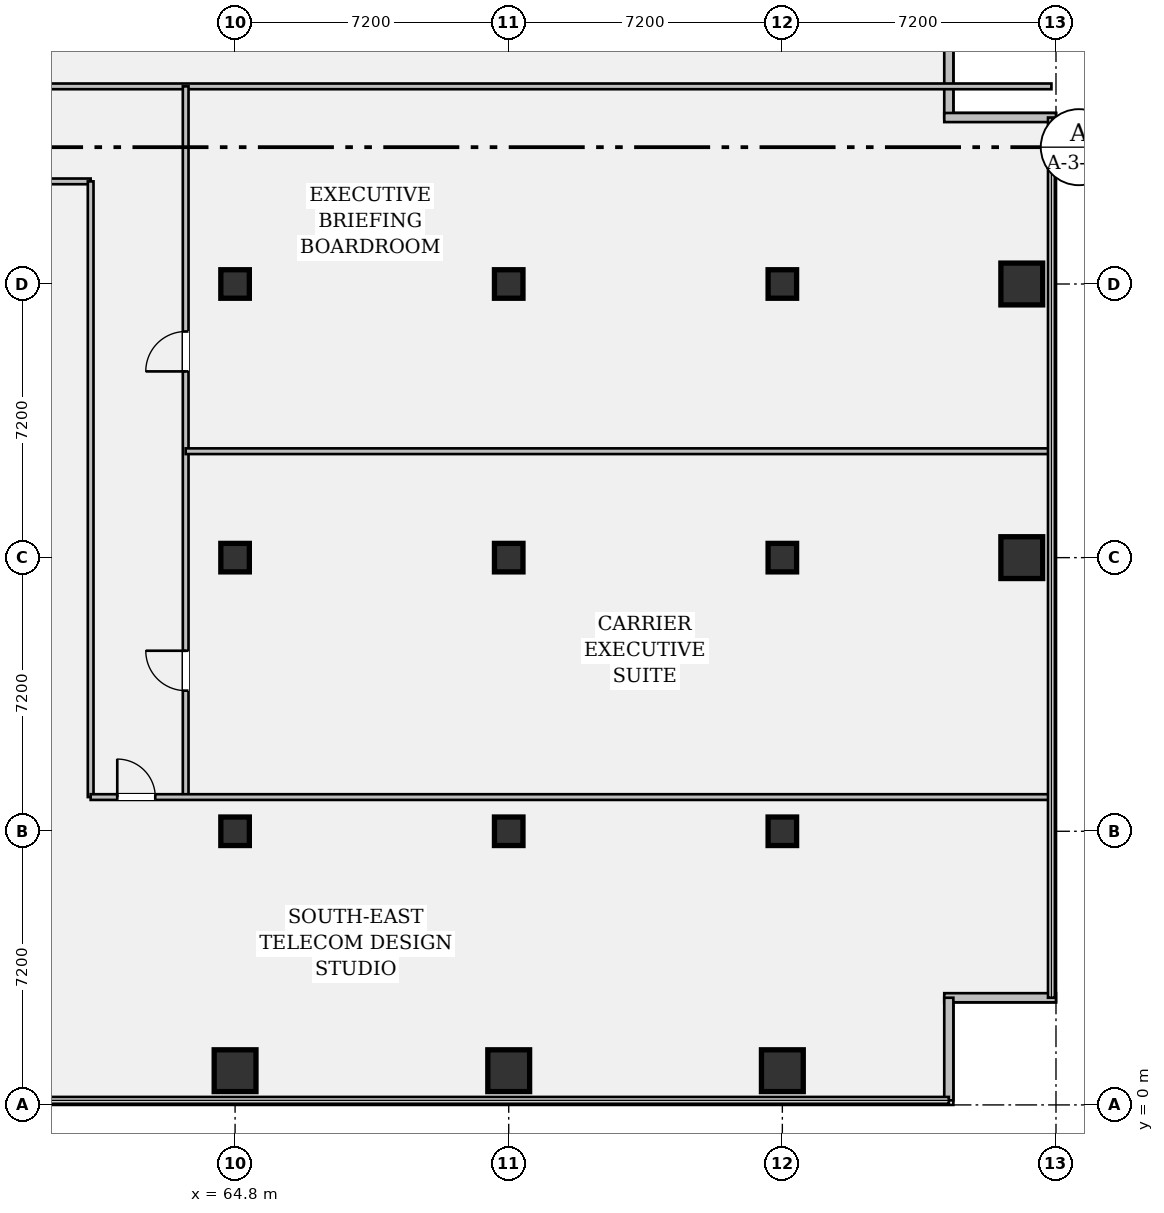
"""IFC4 building model, lengths in metres.
Left out: names, types, materials, properties, quantities, classifications, styles, units other than length and angle.
Written with IfcOpenShell. Run it as: python <this file> out.ifc"""

import sys

from ifc_helpers import new_model, si_unit, direction, frame, frame_2d, origin, origin_2d, place, context, subcontext, project, spatial, rectangle, hollow_rectangle, extrude, element, fill, save


model = new_model("IFC4")
c1 = context("Model", 3, precision=1e-05, world=origin(), true_north=direction((0.0, 1.0)))
c2 = subcontext(c1, "Body", "Model", "MODEL_VIEW")
j1 = project(units=[si_unit("LENGTHUNIT", "METRE"), si_unit("PLANEANGLEUNIT", "RADIAN")], contexts=[c1])
p1 = place(None, origin())
s1 = spatial("IfcSite", under=j1, at=p1, CompositionType="ELEMENT")
p2 = place(p1, origin())
s2 = spatial("IfcBuilding", under=s1, at=p2, CompositionType="ELEMENT")
p3 = place(p2, frame((0.0, 0.0, 22.05)))
s3 = spatial("IfcBuildingStorey", under=s2, at=p3, CompositionType="ELEMENT", Elevation=22.05)
p4 = place(p3, frame((64.8, 0.9, 0.0), z_axis=(0.0, 0.0, 1.0), x_axis=(1.0, 0.0, 0.0)))
e1 = element("IfcColumn", 1, at=p4, inside=s3, PredefinedType="COLUMN", context=c2, shape_type="SweptSolid", body=[
    extrude(hollow_rectangle(XDim=1.1, YDim=1.1, WallThickness=0.07, at=origin_2d()), origin(), (0.0, 0.0, 1.0), 3.9),
])
for number, where, z_axis, x_axis in (
    (2, (64.8, 7.2, 0.0), (0.0, 0.0, 1.0), (1.0, 0.0, 0.0)),
    (3, (64.8, 14.4, 0.0), (0.0, 0.0, 1.0), (1.0, 0.0, 0.0)),
    (4, (64.8, 21.6, 0.0), (0.0, 0.0, 1.0), (1.0, 0.0, 0.0)),
):
    element("IfcColumn", number, at=place(p3, frame(where, z_axis=z_axis, x_axis=x_axis)), inside=s3, PredefinedType="COLUMN", context=c2, shape_type="SweptSolid", body=[
        extrude(rectangle(XDim=0.75, YDim=0.75, at=origin_2d()), origin(), (0.0, 0.0, 1.0), 3.9),
    ])
p5 = place(p3, frame((72.0, 0.9, 0.0), z_axis=(0.0, 0.0, 1.0), x_axis=(1.0, 0.0, 0.0)))
e5 = element("IfcColumn", 5, at=p5, inside=s3, PredefinedType="COLUMN", context=c2, shape_type="SweptSolid", body=[
    extrude(hollow_rectangle(XDim=1.1, YDim=1.1, WallThickness=0.07, at=origin_2d()), origin(), (0.0, 0.0, 1.0), 3.9),
])
for number, where, z_axis, x_axis in (
    (6, (72.0, 7.2, 0.0), (0.0, 0.0, 1.0), (1.0, 0.0, 0.0)),
    (7, (72.0, 14.4, 0.0), (0.0, 0.0, 1.0), (1.0, 0.0, 0.0)),
    (8, (72.0, 21.6, 0.0), (0.0, 0.0, 1.0), (1.0, 0.0, 0.0)),
):
    element("IfcColumn", number, at=place(p3, frame(where, z_axis=z_axis, x_axis=x_axis)), inside=s3, PredefinedType="COLUMN", context=c2, shape_type="SweptSolid", body=[
        extrude(rectangle(XDim=0.75, YDim=0.75, at=origin_2d()), origin(), (0.0, 0.0, 1.0), 3.9),
    ])
p6 = place(p3, frame((79.2, 0.9, 0.0), z_axis=(0.0, 0.0, 1.0), x_axis=(1.0, 0.0, 0.0)))
e9 = element("IfcColumn", 9, at=p6, inside=s3, PredefinedType="COLUMN", context=c2, shape_type="SweptSolid", body=[
    extrude(hollow_rectangle(XDim=1.1, YDim=1.1, WallThickness=0.07, at=origin_2d()), origin(), (0.0, 0.0, 1.0), 3.9),
])
for number, where, z_axis, x_axis in (
    (10, (79.2, 7.2, 0.0), (0.0, 0.0, 1.0), (1.0, 0.0, 0.0)),
    (11, (79.2, 14.4, 0.0), (0.0, 0.0, 1.0), (1.0, 0.0, 0.0)),
    (12, (79.2, 21.6, 0.0), (0.0, 0.0, 1.0), (1.0, 0.0, 0.0)),
):
    element("IfcColumn", number, at=place(p3, frame(where, z_axis=z_axis, x_axis=x_axis)), inside=s3, PredefinedType="COLUMN", context=c2, shape_type="SweptSolid", body=[
        extrude(rectangle(XDim=0.75, YDim=0.75, at=origin_2d()), origin(), (0.0, 0.0, 1.0), 3.9),
    ])
for number, where, z_axis, x_axis in (
    (13, (85.5, 14.4, 0.0), (0.0, 0.0, 1.0), (1.0, 0.0, 0.0)),
    (14, (85.5, 21.6, 0.0), (0.0, 0.0, 1.0), (1.0, 0.0, 0.0)),
):
    element("IfcColumn", number, at=place(p3, frame(where, z_axis=z_axis, x_axis=x_axis)), inside=s3, PredefinedType="COLUMN", context=c2, shape_type="SweptSolid", body=[
        extrude(hollow_rectangle(XDim=1.1, YDim=1.1, WallThickness=0.07, at=origin_2d()), origin(), (0.0, 0.0, 1.0), 3.9),
    ])
p7 = place(p3, frame((83.58, 28.68, 0.0), z_axis=(0.0, 0.0, 1.0), x_axis=(0.0, -1.0, 0.0)))
e15 = element("IfcWall", 15, at=p7, inside=s3, PredefinedType="STANDARD", context=c2, shape_type="SweptSolid", body=[
    extrude(rectangle(XDim=2.7, YDim=0.24, at=frame_2d((1.35, 0.0))), origin(), (0.0, 0.0, 1.0), 3.9),
])
for number, where, z_axis, x_axis in (
    (16, (83.46, 25.98, 0.0), (0.0, 0.0, 1.0), (1.0, 0.0, 0.0)),
    (17, (86.4, 2.82, 0.0), (0.0, 0.0, 1.0), (-1.0, 0.0, 0.0)),
):
    element("IfcWall", number, at=place(p3, frame(where, z_axis=z_axis, x_axis=x_axis)), inside=s3, PredefinedType="STANDARD", context=c2, shape_type="SweptSolid", body=[
        extrude(rectangle(XDim=2.94, YDim=0.24, at=frame_2d((1.47, 0.0))), origin(), (0.0, 0.0, 1.0), 3.9),
    ])
p8 = place(p3, frame((83.58, 2.82, 0.0), z_axis=(0.0, 0.0, 1.0), x_axis=(0.0, -1.0, 0.0)))
e18 = element("IfcWall", 18, at=p8, inside=s3, PredefinedType="STANDARD", context=c2, shape_type="SweptSolid", body=[
    extrude(rectangle(XDim=2.7, YDim=0.24, at=frame_2d((1.35, 0.0))), origin(), (0.0, 0.0, 1.0), 3.9),
])
p9 = place(p3, frame((17.45, 24.3, 0.0), z_axis=(0.0, 0.0, 1.0), x_axis=(1.0, 0.0, 0.0)))
e19 = element("IfcWall", 19, at=p9, inside=s3, PredefinedType="PARTITIONING", context=c2, shape_type="SweptSolid", body=[
    extrude(rectangle(XDim=43.55, YDim=0.15, at=frame_2d((21.775, 0.0))), origin(), (0.0, 0.0, 1.0), 2.958),
])
p10 = place(p9, frame((3.2, 0.0, 0.0)))
e20 = element("IfcOpeningElement", 20, at=p10, cuts=e19, PredefinedType="OPENING", context=c2, shape_type="SweptSolid", body=[
    extrude(rectangle(XDim=1.2, YDim=2.15, at=frame_2d((0.6, 1.075))), frame((0.0, 0.087, 0.0), z_axis=(0.0, -1.0, 0.0), x_axis=(1.0, 0.0, 0.0)), (0.0, 0.0, 1.0), 0.174),
])
p11 = place(p9, frame((20.95, 0.0, 0.0)))
e21 = element("IfcOpeningElement", 21, at=p11, cuts=e19, PredefinedType="OPENING", context=c2, shape_type="SweptSolid", body=[
    extrude(rectangle(XDim=1.2, YDim=2.15, at=frame_2d((0.6, 1.075))), frame((0.0, 0.087, 0.0), z_axis=(0.0, -1.0, 0.0), x_axis=(1.0, 0.0, 0.0)), (0.0, 0.0, 1.0), 0.174),
])
p12 = place(p9, frame((30.55, 0.0, 0.0)))
e22 = element("IfcOpeningElement", 22, at=p12, cuts=e19, PredefinedType="OPENING", context=c2, shape_type="SweptSolid", body=[
    extrude(rectangle(XDim=1.05, YDim=2.15, at=frame_2d((0.525, 1.075))), frame((0.0, 0.087, 0.0), z_axis=(0.0, -1.0, 0.0), x_axis=(1.0, 0.0, 0.0)), (0.0, 0.0, 1.0), 0.174),
])
p13 = place(p3, frame((17.45, 26.8, 0.0), z_axis=(0.0, 0.0, 1.0), x_axis=(1.0, 0.0, 0.0)))
e23 = element("IfcWall", 23, at=p13, inside=s3, PredefinedType="PARTITIONING", context=c2, shape_type="SweptSolid", body=[
    extrude(rectangle(XDim=68.83, YDim=0.15, at=frame_2d((34.415, 0.0))), origin(), (0.0, 0.0, 1.0), 2.958),
])
p14 = place(p13, frame((6.2, 0.0, 0.0)))
e24 = element("IfcOpeningElement", 24, at=p14, cuts=e23, PredefinedType="OPENING", context=c2, shape_type="SweptSolid", body=[
    extrude(rectangle(XDim=1.05, YDim=2.15, at=frame_2d((0.525, 1.075))), frame((0.0, 0.087, 0.0), z_axis=(0.0, -1.0, 0.0), x_axis=(1.0, 0.0, 0.0)), (0.0, 0.0, 1.0), 0.174),
])
p15 = place(p13, frame((20.4, 0.0, 0.0)))
e25 = element("IfcOpeningElement", 25, at=p15, cuts=e23, PredefinedType="OPENING", context=c2, shape_type="SweptSolid", body=[
    extrude(rectangle(XDim=1.05, YDim=2.15, at=frame_2d((0.525, 1.075))), frame((0.0, 0.087, 0.0), z_axis=(0.0, -1.0, 0.0), x_axis=(1.0, 0.0, 0.0)), (0.0, 0.0, 1.0), 0.174),
])
p16 = place(p3, frame((61.0, 8.1, 0.0), z_axis=(0.0, 0.0, 1.0), x_axis=(0.0, 1.0, 0.0)))
e26 = element("IfcWall", 26, at=p16, inside=s3, PredefinedType="PARTITIONING", context=c2, shape_type="SweptSolid", body=[
    extrude(rectangle(XDim=16.2, YDim=0.15, at=frame_2d((8.1, 0.0))), origin(), (0.0, 0.0, 1.0), 2.958),
])
p17 = place(p3, frame((63.5, 8.1, 0.0), z_axis=(0.0, 0.0, 1.0), x_axis=(0.0, 1.0, 0.0)))
e27 = element("IfcWall", 27, at=p17, inside=s3, PredefinedType="PARTITIONING", context=c2, shape_type="SweptSolid", body=[
    extrude(rectangle(XDim=18.7, YDim=0.15, at=frame_2d((9.35, 0.0))), origin(), (0.0, 0.0, 1.0), 2.958),
])
p18 = place(p17, frame((11.2, 0.0, 0.0)))
e28 = element("IfcOpeningElement", 28, at=p18, cuts=e27, PredefinedType="OPENING", context=c2, shape_type="SweptSolid", body=[
    extrude(rectangle(XDim=1.05, YDim=2.15, at=frame_2d((0.525, 1.075))), frame((0.0, 0.087, 0.0), z_axis=(0.0, -1.0, 0.0), x_axis=(1.0, 0.0, 0.0)), (0.0, 0.0, 1.0), 0.174),
])
p19 = place(p17, frame((2.8, 0.0, 0.0)))
e29 = element("IfcOpeningElement", 29, at=p19, cuts=e27, PredefinedType="OPENING", context=c2, shape_type="SweptSolid", body=[
    extrude(rectangle(XDim=1.05, YDim=2.15, at=frame_2d((0.525, 1.075))), frame((0.0, 0.087, 0.0), z_axis=(0.0, -1.0, 0.0), x_axis=(1.0, 0.0, 0.0)), (0.0, 0.0, 1.0), 0.174),
])
p20 = place(p3, frame((61.0, 8.1, 0.0), z_axis=(0.0, 0.0, 1.0), x_axis=(1.0, 0.0, 0.0)))
e30 = element("IfcWall", 30, at=p20, inside=s3, PredefinedType="PARTITIONING", context=c2, shape_type="SweptSolid", body=[
    extrude(rectangle(XDim=25.28, YDim=0.15, at=frame_2d((12.64, 0.0))), origin(), (0.0, 0.0, 1.0), 2.958),
])
p21 = place(p20, frame((0.7, 0.0, 0.0)))
e31 = element("IfcOpeningElement", 31, at=p21, cuts=e30, PredefinedType="OPENING", context=c2, shape_type="SweptSolid", body=[
    extrude(rectangle(XDim=1.0, YDim=2.15, at=frame_2d((0.5, 1.075))), frame((0.0, 0.087, 0.0), z_axis=(0.0, -1.0, 0.0), x_axis=(1.0, 0.0, 0.0)), (0.0, 0.0, 1.0), 0.174),
])
p22 = place(p3, frame((63.5, 17.2, 0.0), z_axis=(0.0, 0.0, 1.0), x_axis=(1.0, 0.0, 0.0)))
e32 = element("IfcWall", 32, at=p22, inside=s3, PredefinedType="PARTITIONING", context=c2, shape_type="SweptSolid", body=[
    extrude(rectangle(XDim=22.78, YDim=0.15, at=frame_2d((11.39, 0.0))), origin(), (0.0, 0.0, 1.0), 2.958),
])
p23 = place(p18, origin())
e33 = element("IfcDoor", 33, at=p23, inside=s3, OperationType="SINGLE_SWING_LEFT", PredefinedType="DOOR", context=c2, shape_type="SweptSolid", body=[
    extrude(rectangle(XDim=1.05, YDim=2.15, at=frame_2d((0.525, 1.075))), frame((0.0, 0.025, 0.0), z_axis=(0.0, -1.0, 0.0), x_axis=(1.0, 0.0, 0.0)), (0.0, 0.0, 1.0), 0.05),
])
fill(e28, e33)
p24 = place(p19, origin())
e34 = element("IfcDoor", 34, at=p24, inside=s3, OperationType="SINGLE_SWING_RIGHT", PredefinedType="DOOR", context=c2, shape_type="SweptSolid", body=[
    extrude(rectangle(XDim=1.05, YDim=2.15, at=frame_2d((0.525, 1.075))), frame((0.0, 0.025, 0.0), z_axis=(0.0, -1.0, 0.0), x_axis=(1.0, 0.0, 0.0)), (0.0, 0.0, 1.0), 0.05),
])
fill(e29, e34)
p25 = place(p21, origin())
e35 = element("IfcDoor", 35, at=p25, inside=s3, OperationType="SINGLE_SWING_LEFT", PredefinedType="DOOR", context=c2, shape_type="SweptSolid", body=[
    extrude(rectangle(XDim=1.0, YDim=2.15, at=frame_2d((0.5, 1.075))), frame((0.0, 0.025, 0.0), z_axis=(0.0, -1.0, 0.0), x_axis=(1.0, 0.0, 0.0)), (0.0, 0.0, 1.0), 0.05),
])
fill(e31, e35)
save(model, sys.argv[1])
